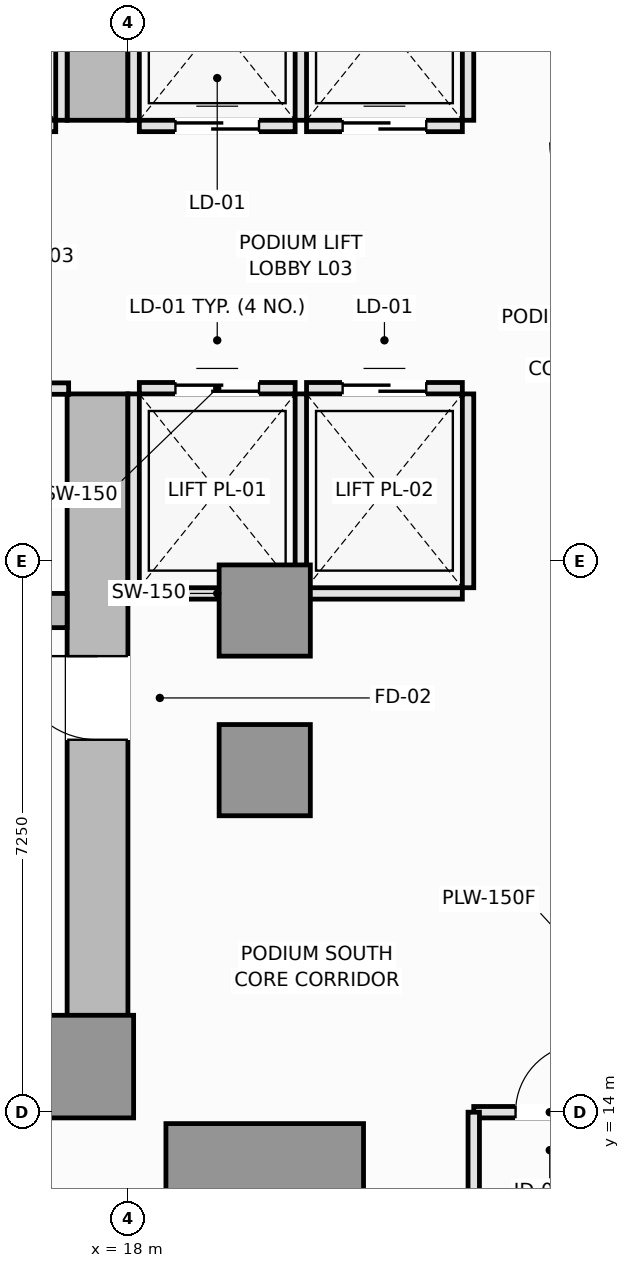
"""IFC4 building model, lengths in metres.
Left out: names, types, materials, properties, quantities, classifications, styles, units other than length and angle.
Written with IfcOpenShell. Run it as: python <this file> out.ifc"""

import sys

from ifc_helpers import new_model, si_unit, direction, frame, frame_2d, origin, origin_2d, place, context, subcontext, project, spatial, rectangle, extrude, element, fill, save


model = new_model("IFC4")
c1 = context("Model", 3, precision=1e-05, world=origin(), true_north=direction((0.0, 1.0)))
c2 = subcontext(c1, "Body", "Model", "MODEL_VIEW")
j1 = project(units=[si_unit("LENGTHUNIT", "METRE"), si_unit("PLANEANGLEUNIT", "RADIAN")], contexts=[c1])
p1 = place(None, origin())
s1 = spatial("IfcSite", under=j1, at=p1, CompositionType="ELEMENT")
p2 = place(p1, origin())
s2 = spatial("IfcBuilding", under=s1, at=p2, CompositionType="ELEMENT")
p3 = place(p2, frame((0.0, 0.0, 15.6)))
s3 = spatial("IfcBuildingStorey", under=s2, at=p3, CompositionType="ELEMENT", Elevation=15.6)
p4 = place(p3, frame((4.5, 14.4, 0.0), z_axis=(0.0, 0.0, 1.0), x_axis=(1.0, 0.0, 0.0)))
e1 = element("IfcWall", 1, at=p4, inside=s3, PredefinedType="SHEAR", context=c2, shape_type="SweptSolid", body=[
    extrude(rectangle(XDim=13.5, YDim=0.8, at=frame_2d((6.75, 0.0))), origin(), (0.0, 0.0, 1.0), 4.8),
])
p5 = place(p3, frame((17.6, 14.8, 0.0), z_axis=(0.0, 0.0, 1.0), x_axis=(0.0, 1.0, 0.0)))
e2 = element("IfcWall", 2, at=p5, inside=s3, PredefinedType="SHEAR", context=c2, shape_type="SweptSolid", body=[
    extrude(rectangle(XDim=8.65, YDim=0.8, at=frame_2d((4.325, 0.0))), origin(), (0.0, 0.0, 1.0), 4.8),
])
p6 = place(p5, frame((4.1, 0.0, 0.0)))
e3 = element("IfcOpeningElement", 3, at=p6, cuts=e2, PredefinedType="OPENING", context=c2, shape_type="SweptSolid", body=[
    extrude(rectangle(XDim=1.1, YDim=2.15, at=frame_2d((0.55, 1.075))), frame((0.0, 0.41, 0.0), z_axis=(0.0, -1.0, 0.0), x_axis=(1.0, 0.0, 0.0)), (0.0, 0.0, 1.0), 0.82),
])
p7 = place(p3, frame((17.6, 27.05, 0.0), z_axis=(0.0, 0.0, 1.0), x_axis=(0.0, 1.0, 0.0)))
e4 = element("IfcWall", 4, at=p7, inside=s3, PredefinedType="SHEAR", context=c2, shape_type="SweptSolid", body=[
    extrude(rectangle(XDim=8.65, YDim=0.8, at=frame_2d((4.325, 0.0))), origin(), (0.0, 0.0, 1.0), 4.8),
])
p8 = place(p7, frame((3.45, 0.0, 0.0)))
e5 = element("IfcOpeningElement", 5, at=p8, cuts=e4, PredefinedType="OPENING", context=c2, shape_type="SweptSolid", body=[
    extrude(rectangle(XDim=1.1, YDim=2.15, at=frame_2d((0.55, 1.075))), frame((0.0, 0.41, 0.0), z_axis=(0.0, -1.0, 0.0), x_axis=(1.0, 0.0, 0.0)), (0.0, 0.0, 1.0), 0.82),
])
p9 = place(p3, frame((5.3, 20.6, 0.0), z_axis=(0.0, 0.0, 1.0), x_axis=(1.0, 0.0, 0.0)))
e6 = element("IfcWall", 6, at=p9, inside=s3, PredefinedType="SHEAR", context=c2, shape_type="SweptSolid", body=[
    extrude(rectangle(XDim=11.9, YDim=0.45, at=frame_2d((5.95, 0.0))), origin(), (0.0, 0.0, 1.0), 4.8),
])
p10 = place(p3, frame((17.4, 14.6, 0.0), z_axis=(0.0, 0.0, 1.0), x_axis=(1.0, 0.0, 0.0)))
e7 = element("IfcColumn", 7, at=p10, inside=s3, PredefinedType="PILASTER", context=c2, shape_type="SweptSolid", body=[
    extrude(rectangle(XDim=1.35, YDim=1.35, at=origin_2d()), origin(), (0.0, 0.0, 1.0), 4.8),
])
p11 = place(p3, frame((19.8, 12.75, 0.0), z_axis=(0.0, 0.0, 1.0), x_axis=(1.0, 0.0, 0.0)))
e8 = element("IfcColumn", 8, at=p11, inside=s3, PredefinedType="COLUMN", context=c2, shape_type="SweptSolid", body=[
    extrude(rectangle(XDim=2.6, YDim=2.2, at=origin_2d()), origin(), (0.0, 0.0, 1.0), 4.8),
])
for number, where, z_axis, x_axis in (
    (9, (19.8, 18.5, 0.0), (0.0, 0.0, 1.0), (1.0, 0.0, 0.0)),
    (10, (19.8, 20.6, 0.0), (0.0, 0.0, 1.0), (1.0, 0.0, 0.0)),
):
    element("IfcColumn", number, at=place(p3, frame(where, z_axis=z_axis, x_axis=x_axis)), inside=s3, PredefinedType="COLUMN", context=c2, shape_type="SweptSolid", body=[
        extrude(rectangle(XDim=1.2, YDim=1.2, at=origin_2d()), origin(), (0.0, 0.0, 1.0), 4.8),
    ])
p12 = place(p3, frame((18.15, 20.825, 0.0), z_axis=(0.0, 0.0, 1.0), x_axis=(1.0, 0.0, 0.0)))
e11 = element("IfcWall", 11, at=p12, inside=s3, PredefinedType="PARTITIONING", context=c2, shape_type="SweptSolid", body=[
    extrude(rectangle(XDim=2.05, YDim=0.15, at=frame_2d((1.025, 0.0))), origin(), (0.0, 0.0, 1.0), 4.6),
])
p13 = place(p3, frame((18.15, 23.525, 0.0), z_axis=(0.0, 0.0, 1.0), x_axis=(1.0, 0.0, 0.0)))
e12 = element("IfcWall", 12, at=p13, inside=s3, PredefinedType="PARTITIONING", context=c2, shape_type="SweptSolid", body=[
    extrude(rectangle(XDim=2.05, YDim=0.15, at=frame_2d((1.025, 0.0))), origin(), (0.0, 0.0, 1.0), 4.6),
])
p14 = place(p13, frame((0.475, 0.0, 0.0)))
e13 = element("IfcOpeningElement", 13, at=p14, cuts=e12, PredefinedType="OPENING", context=c2, shape_type="SweptSolid", body=[
    extrude(rectangle(XDim=1.1, YDim=2.2, at=frame_2d((0.55, 1.1))), frame((0.0, 0.085, 0.0), z_axis=(0.0, -1.0, 0.0), x_axis=(1.0, 0.0, 0.0)), (0.0, 0.0, 1.0), 0.17),
])
for number, where, z_axis, x_axis in (
    (14, (18.075, 20.9, 0.0), (0.0, 0.0, 1.0), (0.0, 1.0, 0.0)),
    (15, (20.275, 20.9, 0.0), (0.0, 0.0, 1.0), (0.0, 1.0, 0.0)),
):
    element("IfcWall", number, at=place(p3, frame(where, z_axis=z_axis, x_axis=x_axis)), inside=s3, PredefinedType="PARTITIONING", context=c2, shape_type="SweptSolid", body=[
        extrude(rectangle(XDim=2.55, YDim=0.15, at=frame_2d((1.275, 0.0))), origin(), (0.0, 0.0, 1.0), 4.6),
    ])
p15 = place(p3, frame((20.35, 20.825, 0.0), z_axis=(0.0, 0.0, 1.0), x_axis=(1.0, 0.0, 0.0)))
e16 = element("IfcWall", 16, at=p15, inside=s3, PredefinedType="PARTITIONING", context=c2, shape_type="SweptSolid", body=[
    extrude(rectangle(XDim=2.05, YDim=0.15, at=frame_2d((1.025, 0.0))), origin(), (0.0, 0.0, 1.0), 4.6),
])
p16 = place(p3, frame((20.35, 23.525, 0.0), z_axis=(0.0, 0.0, 1.0), x_axis=(1.0, 0.0, 0.0)))
e17 = element("IfcWall", 17, at=p16, inside=s3, PredefinedType="PARTITIONING", context=c2, shape_type="SweptSolid", body=[
    extrude(rectangle(XDim=2.05, YDim=0.15, at=frame_2d((1.025, 0.0))), origin(), (0.0, 0.0, 1.0), 4.6),
])
p17 = place(p16, frame((0.475, 0.0, 0.0)))
e18 = element("IfcOpeningElement", 18, at=p17, cuts=e17, PredefinedType="OPENING", context=c2, shape_type="SweptSolid", body=[
    extrude(rectangle(XDim=1.1, YDim=2.2, at=frame_2d((0.55, 1.1))), frame((0.0, 0.085, 0.0), z_axis=(0.0, -1.0, 0.0), x_axis=(1.0, 0.0, 0.0)), (0.0, 0.0, 1.0), 0.17),
])
p18 = place(p3, frame((22.475, 20.9, 0.0), z_axis=(0.0, 0.0, 1.0), x_axis=(0.0, 1.0, 0.0)))
e19 = element("IfcWall", 19, at=p18, inside=s3, PredefinedType="PARTITIONING", context=c2, shape_type="SweptSolid", body=[
    extrude(rectangle(XDim=2.55, YDim=0.15, at=frame_2d((1.275, 0.0))), origin(), (0.0, 0.0, 1.0), 4.6),
])
p19 = place(p3, frame((18.15, 26.975, 0.0), z_axis=(0.0, 0.0, 1.0), x_axis=(1.0, 0.0, 0.0)))
e20 = element("IfcWall", 20, at=p19, inside=s3, PredefinedType="PARTITIONING", context=c2, shape_type="SweptSolid", body=[
    extrude(rectangle(XDim=2.05, YDim=0.15, at=frame_2d((1.025, 0.0))), origin(), (0.0, 0.0, 1.0), 4.6),
])
p20 = place(p19, frame((0.475, 0.0, 0.0)))
e21 = element("IfcOpeningElement", 21, at=p20, cuts=e20, PredefinedType="OPENING", context=c2, shape_type="SweptSolid", body=[
    extrude(rectangle(XDim=1.1, YDim=2.2, at=frame_2d((0.55, 1.1))), frame((0.0, 0.085, 0.0), z_axis=(0.0, -1.0, 0.0), x_axis=(1.0, 0.0, 0.0)), (0.0, 0.0, 1.0), 0.17),
])
for number, where, z_axis, x_axis in (
    (22, (18.075, 27.05, 0.0), (0.0, 0.0, 1.0), (0.0, 1.0, 0.0)),
    (23, (20.275, 27.05, 0.0), (0.0, 0.0, 1.0), (0.0, 1.0, 0.0)),
):
    element("IfcWall", number, at=place(p3, frame(where, z_axis=z_axis, x_axis=x_axis)), inside=s3, PredefinedType="PARTITIONING", context=c2, shape_type="SweptSolid", body=[
        extrude(rectangle(XDim=2.55, YDim=0.15, at=frame_2d((1.275, 0.0))), origin(), (0.0, 0.0, 1.0), 4.6),
    ])
p21 = place(p3, frame((20.35, 26.975, 0.0), z_axis=(0.0, 0.0, 1.0), x_axis=(1.0, 0.0, 0.0)))
e24 = element("IfcWall", 24, at=p21, inside=s3, PredefinedType="PARTITIONING", context=c2, shape_type="SweptSolid", body=[
    extrude(rectangle(XDim=2.05, YDim=0.15, at=frame_2d((1.025, 0.0))), origin(), (0.0, 0.0, 1.0), 4.6),
])
p22 = place(p21, frame((0.475, 0.0, 0.0)))
e25 = element("IfcOpeningElement", 25, at=p22, cuts=e24, PredefinedType="OPENING", context=c2, shape_type="SweptSolid", body=[
    extrude(rectangle(XDim=1.1, YDim=2.2, at=frame_2d((0.55, 1.1))), frame((0.0, 0.085, 0.0), z_axis=(0.0, -1.0, 0.0), x_axis=(1.0, 0.0, 0.0)), (0.0, 0.0, 1.0), 0.17),
])
p23 = place(p3, frame((22.475, 27.05, 0.0), z_axis=(0.0, 0.0, 1.0), x_axis=(0.0, 1.0, 0.0)))
e26 = element("IfcWall", 26, at=p23, inside=s3, PredefinedType="PARTITIONING", context=c2, shape_type="SweptSolid", body=[
    extrude(rectangle(XDim=2.55, YDim=0.15, at=frame_2d((1.275, 0.0))), origin(), (0.0, 0.0, 1.0), 4.6),
])
p24 = place(p3, frame((14.5, 26.975, 0.0), z_axis=(0.0, 0.0, 1.0), x_axis=(1.0, 0.0, 0.0)))
e27 = element("IfcWall", 27, at=p24, inside=s3, PredefinedType="PARTITIONING", context=c2, shape_type="SweptSolid", body=[
    extrude(rectangle(XDim=2.55, YDim=0.15, at=frame_2d((1.275, 0.0))), origin(), (0.0, 0.0, 1.0), 4.6),
])
p25 = place(p24, frame((0.625, 0.0, 0.0)))
e28 = element("IfcOpeningElement", 28, at=p25, cuts=e27, PredefinedType="OPENING", context=c2, shape_type="SweptSolid", body=[
    extrude(rectangle(XDim=1.3, YDim=2.2, at=frame_2d((0.65, 1.1))), frame((0.0, 0.085, 0.0), z_axis=(0.0, -1.0, 0.0), x_axis=(1.0, 0.0, 0.0)), (0.0, 0.0, 1.0), 0.17),
])
p26 = place(p3, frame((17.125, 27.05, 0.0), z_axis=(0.0, 0.0, 1.0), x_axis=(0.0, 1.0, 0.0)))
e29 = element("IfcWall", 29, at=p26, inside=s3, PredefinedType="PARTITIONING", context=c2, shape_type="SweptSolid", body=[
    extrude(rectangle(XDim=2.6, YDim=0.15, at=frame_2d((1.3, 0.0))), origin(), (0.0, 0.0, 1.0), 4.6),
])
p27 = place(p3, frame((14.33, 23.52, 0.0), z_axis=(0.0, 0.0, 1.0), x_axis=(1.0, 0.0, 0.0)))
e30 = element("IfcWall", 30, at=p27, inside=s3, PredefinedType="PARTITIONING", context=c2, shape_type="SweptSolid", body=[
    extrude(rectangle(XDim=2.89, YDim=0.15, at=frame_2d((1.445, 0.0))), origin(), (0.0, 0.0, 1.0), 4.6),
])
p28 = place(p27, frame((1.053, 0.0, 0.0)))
e31 = element("IfcOpeningElement", 31, at=p28, cuts=e30, PredefinedType="OPENING", context=c2, shape_type="SweptSolid", body=[
    extrude(rectangle(XDim=0.9, YDim=2.1, at=frame_2d((0.45, 1.05))), frame((0.0, 0.085, 0.0), z_axis=(0.0, -1.0, 0.0), x_axis=(1.0, 0.0, 0.0)), (0.0, 0.0, 1.0), 0.17),
])
p29 = place(p3, frame((22.55, 14.0, 0.0), z_axis=(0.0, 0.0, 1.0), x_axis=(1.0, 0.0, 0.0)))
e32 = element("IfcWall", 32, at=p29, inside=s3, PredefinedType="PARTITIONING", context=c2, shape_type="SweptSolid", body=[
    extrude(rectangle(XDim=2.0, YDim=0.15, at=frame_2d((1.0, 0.0))), origin(), (0.0, 0.0, 1.0), 4.6),
])
p30 = place(p29, frame((0.55, 0.0, 0.0)))
e33 = element("IfcOpeningElement", 33, at=p30, cuts=e32, PredefinedType="OPENING", context=c2, shape_type="SweptSolid", body=[
    extrude(rectangle(XDim=0.9, YDim=2.1, at=frame_2d((0.45, 1.05))), frame((0.0, 0.085, 0.0), z_axis=(0.0, -1.0, 0.0), x_axis=(1.0, 0.0, 0.0)), (0.0, 0.0, 1.0), 0.17),
])
p31 = place(p3, frame((22.55, 11.75, 0.0), z_axis=(0.0, 0.0, 1.0), x_axis=(0.0, 1.0, 0.0)))
e34 = element("IfcWall", 34, at=p31, inside=s3, PredefinedType="PARTITIONING", context=c2, shape_type="SweptSolid", body=[
    extrude(rectangle(XDim=2.25, YDim=0.15, at=frame_2d((1.125, 0.0))), origin(), (0.0, 0.0, 1.0), 4.6),
])
p32 = place(p14, origin())
e35 = element("IfcDoor", 35, at=p32, inside=s3, OperationType="DOUBLE_DOOR_SLIDING", PredefinedType="DOOR", context=c2, shape_type="SweptSolid", body=[
    extrude(rectangle(XDim=1.1, YDim=2.2, at=frame_2d((0.55, 1.1))), frame((0.0, 0.025, 0.0), z_axis=(0.0, -1.0, 0.0), x_axis=(1.0, 0.0, 0.0)), (0.0, 0.0, 1.0), 0.05),
])
fill(e13, e35)
p33 = place(p17, origin())
e36 = element("IfcDoor", 36, at=p33, inside=s3, OperationType="DOUBLE_DOOR_SLIDING", PredefinedType="DOOR", context=c2, shape_type="SweptSolid", body=[
    extrude(rectangle(XDim=1.1, YDim=2.2, at=frame_2d((0.55, 1.1))), frame((0.0, 0.025, 0.0), z_axis=(0.0, -1.0, 0.0), x_axis=(1.0, 0.0, 0.0)), (0.0, 0.0, 1.0), 0.05),
])
fill(e18, e36)
p34 = place(p20, origin())
e37 = element("IfcDoor", 37, at=p34, inside=s3, OperationType="DOUBLE_DOOR_SLIDING", PredefinedType="DOOR", context=c2, shape_type="SweptSolid", body=[
    extrude(rectangle(XDim=1.1, YDim=2.2, at=frame_2d((0.55, 1.1))), frame((0.0, 0.025, 0.0), z_axis=(0.0, -1.0, 0.0), x_axis=(1.0, 0.0, 0.0)), (0.0, 0.0, 1.0), 0.05),
])
fill(e21, e37)
p35 = place(p22, origin())
e38 = element("IfcDoor", 38, at=p35, inside=s3, OperationType="DOUBLE_DOOR_SLIDING", PredefinedType="DOOR", context=c2, shape_type="SweptSolid", body=[
    extrude(rectangle(XDim=1.1, YDim=2.2, at=frame_2d((0.55, 1.1))), frame((0.0, 0.025, 0.0), z_axis=(0.0, -1.0, 0.0), x_axis=(1.0, 0.0, 0.0)), (0.0, 0.0, 1.0), 0.05),
])
fill(e25, e38)
p36 = place(p6, origin())
e39 = element("IfcDoor", 39, at=p36, inside=s3, OperationType="SINGLE_SWING_RIGHT", PredefinedType="DOOR", context=c2, shape_type="SweptSolid", body=[
    extrude(rectangle(XDim=1.1, YDim=2.15, at=frame_2d((0.55, 1.075))), frame((0.0, 0.025, 0.0), z_axis=(0.0, -1.0, 0.0), x_axis=(1.0, 0.0, 0.0)), (0.0, 0.0, 1.0), 0.05),
])
fill(e3, e39)
p37 = place(p30, origin())
e40 = element("IfcDoor", 40, at=p37, inside=s3, OperationType="SINGLE_SWING_RIGHT", PredefinedType="DOOR", context=c2, shape_type="SweptSolid", body=[
    extrude(rectangle(XDim=0.9, YDim=2.1, at=frame_2d((0.45, 1.05))), frame((0.0, 0.025, 0.0), z_axis=(0.0, -1.0, 0.0), x_axis=(1.0, 0.0, 0.0)), (0.0, 0.0, 1.0), 0.05),
])
fill(e33, e40)
save(model, sys.argv[1])
